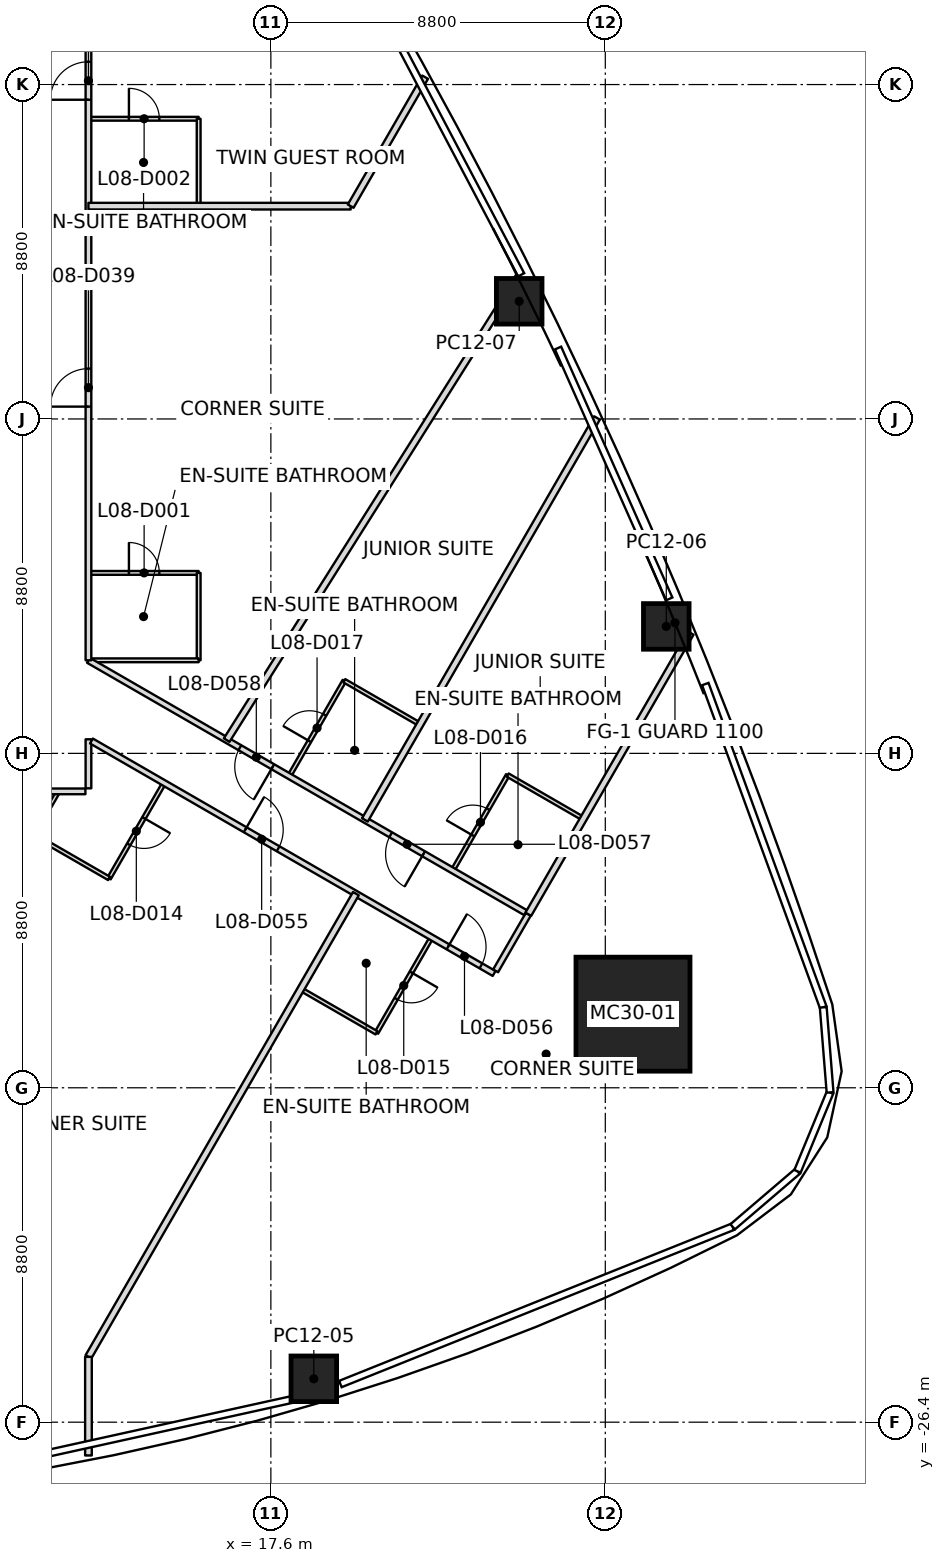
"""IFC4 building model, lengths in metres.
Left out: names, types, materials, properties, quantities, classifications, styles, units other than length and angle.
Written with IfcOpenShell. Run it as: python <this file> out.ifc"""

import sys

from ifc_helpers import new_model, si_unit, direction, frame, frame_2d, origin, origin_2d, place, context, subcontext, project, spatial, rectangle, extrude, clip, halfspace, element, fill, save


model = new_model("IFC4")
c1 = context("Model", 3, precision=1e-05, world=origin(), true_north=direction((0.0, 1.0)))
c2 = subcontext(c1, "Body", "Model", "MODEL_VIEW")
j1 = project(units=[si_unit("LENGTHUNIT", "METRE"), si_unit("PLANEANGLEUNIT", "RADIAN")], contexts=[c1])
p1 = place(None, origin())
s1 = spatial("IfcSite", under=j1, at=p1, CompositionType="ELEMENT")
p2 = place(p1, origin())
s2 = spatial("IfcBuilding", under=s1, at=p2, CompositionType="ELEMENT")
p3 = place(p2, frame((0.0, 0.0, 51.7)))
s3 = spatial("IfcBuildingStorey", under=s2, at=p3, CompositionType="ELEMENT", Elevation=51.7)
p4 = place(p3, frame((27.128, -15.663, 0.0), z_axis=(-0.030531992032, 0.017607001884, 0.999378702468), x_axis=(0.999533790055, 0.000537827582, 0.03052725469)))
e1 = element("IfcColumn", 1, at=p4, inside=s3, PredefinedType="COLUMN", context=c2, shape_type="SweptSolid", body=[
    extrude(rectangle(XDim=3.0, YDim=3.0, at=origin_2d()), origin(), (0.0, 0.0, 1.0), 3.702),
])
p5 = place(p3, frame((18.73, -25.258, 0.0), z_axis=(-0.018960260892, 0.176875858454, 0.984050526753), x_axis=(0.957447491583, 0.286704825548, -0.033085402656)))
e2 = element("IfcColumn", 2, at=p5, inside=s3, PredefinedType="COLUMN", context=c2, shape_type="SweptSolid", body=[
    clip(clip(extrude(rectangle(XDim=1.2, YDim=1.2, at=origin_2d()), origin(), (0.0, 0.0, 1.0), 3.76), halfspace(frame((0.0, 0.0, 0.001)), True)), halfspace(frame((0.0, 0.0, 3.759)), False)),
])
p6 = place(p3, frame((28.005, -5.459, 0.0), z_axis=(-0.019460655113, 0.011016709844, 0.999749926235), x_axis=(-0.381854725948, 0.924054467724, -0.017615588272)))
e3 = element("IfcColumn", 3, at=p6, inside=s3, PredefinedType="COLUMN", context=c2, shape_type="SweptSolid", body=[
    extrude(rectangle(XDim=1.2, YDim=1.2, at=origin_2d()), origin(), (0.0, 0.0, 1.0), 3.701),
])
p7 = place(p3, frame((24.135, 3.097, 0.0), z_axis=(-0.015306644787, 0.002309192102, 0.99988017995), x_axis=(-0.441869025953, 0.897036057616, -0.008836019534)))
e4 = element("IfcColumn", 4, at=p7, inside=s3, PredefinedType="COLUMN", context=c2, shape_type="SweptSolid", body=[
    extrude(rectangle(XDim=1.2, YDim=1.2, at=origin_2d()), origin(), (0.0, 0.0, 1.0), 3.7),
])
p8 = place(p3, frame((19.837, -12.492, 0.0), z_axis=(0.0, 0.0, 1.0), x_axis=(-0.499999252047, -0.866025835615, 0.0)))
e5 = element("IfcWall", 5, at=p8, inside=s3, PredefinedType="PARTITIONING", context=c2, shape_type="SweptSolid", body=[
    extrude(rectangle(XDim=14.074, YDim=0.175, at=frame_2d((7.037, 0.0))), origin(), (0.0, 0.0, 1.0), 2.797),
])
p9 = place(p3, frame((12.8, -24.68, 0.0), z_axis=(0.0, 0.0, 1.0), x_axis=(0.0, -1.0, 0.0)))
e6 = element("IfcWall", 6, at=p9, inside=s3, PredefinedType="PARTITIONING", context=c2, shape_type="SweptSolid", body=[
    extrude(rectangle(XDim=2.595, YDim=0.175, at=frame_2d((1.298, 0.0))), origin(), (0.0, 0.0, 1.0), 2.934),
])
p10 = place(p3, frame((12.8, 5.6, 0.0), z_axis=(0.0, 0.0, 1.0), x_axis=(1.0, 0.0, 0.0)))
e7 = element("IfcWall", 7, at=p10, inside=s3, PredefinedType="PARTITIONING", context=c2, shape_type="SweptSolid", body=[
    extrude(rectangle(XDim=6.9, YDim=0.175, at=frame_2d((3.45, 0.0))), origin(), (0.0, 0.0, 1.0), 3.093),
])
p11 = place(p3, frame((19.7, 5.6, 0.0), z_axis=(0.0, 0.0, 1.0), x_axis=(0.500038841519, 0.866002977462, 0.0)))
e8 = element("IfcWall", 8, at=p11, inside=s3, PredefinedType="PARTITIONING", context=c2, shape_type="SweptSolid", body=[
    extrude(rectangle(XDim=3.919, YDim=0.175, at=frame_2d((1.959, 0.0))), origin(), (0.0, 0.0, 1.0), 2.934),
])
p12 = place(p3, frame((24.12, 3.739, 0.0), z_axis=(0.0, 0.0, 1.0), x_axis=(-0.533199701386, -0.845989407996, 0.0)))
e9 = element("IfcWall", 9, at=p12, inside=s3, PredefinedType="PARTITIONING", context=c2, shape_type="SweptSolid", body=[
    extrude(rectangle(XDim=14.408, YDim=0.175, at=frame_2d((7.204, 0.0))), origin(), (0.0, 0.0, 1.0), 2.947),
])
p13 = place(p3, frame((20.075, -10.551, 0.0), z_axis=(0.0, 0.0, 1.0), x_axis=(0.500002172007, 0.866024149772, 0.0)))
e10 = element("IfcWall", 10, at=p13, inside=s3, PredefinedType="PARTITIONING", context=c2, shape_type="SweptSolid", body=[
    extrude(rectangle(XDim=12.214, YDim=0.175, at=frame_2d((6.107, 0.0))), origin(), (0.0, 0.0, 1.0), 2.934),
])
p14 = place(p3, frame((24.374, -13.033, 0.0), z_axis=(0.0, 0.0, 1.0), x_axis=(0.499992885873, 0.866029511089, 0.0)))
e11 = element("IfcWall", 11, at=p14, inside=s3, PredefinedType="PARTITIONING", context=c2, shape_type="SweptSolid", body=[
    extrude(rectangle(XDim=8.544, YDim=0.175, at=frame_2d((4.272, 0.0))), origin(), (0.0, 0.0, 1.0), 2.934),
])
p15 = place(p3, frame((-12.72, -9.8, 0.0), z_axis=(0.0, 0.0, 1.0), x_axis=(1.0, 0.0, 0.0)))
e12 = element("IfcWall", 12, at=p15, inside=s3, PredefinedType="PARTITIONING", context=c2, shape_type="SweptSolid", body=[
    extrude(rectangle(XDim=25.44, YDim=0.15, at=frame_2d((12.72, 0.0))), origin(), (0.0, 0.0, 1.0), 2.947),
])
p16 = place(p15, frame((7.32, 0.0, 0.0)))
e13 = element("IfcOpeningElement", 13, at=p16, cuts=e12, PredefinedType="OPENING", context=c2, shape_type="SweptSolid", body=[
    extrude(rectangle(XDim=1.0, YDim=2.1, at=frame_2d((0.5, 1.05))), frame((0.0, 0.075, 0.0), z_axis=(0.0, -1.0, 0.0), x_axis=(1.0, 0.0, 0.0)), (0.0, 0.0, 1.0), 0.15),
])
p17 = place(p15, frame((11.52, 0.0, 0.0)))
e14 = element("IfcOpeningElement", 14, at=p17, cuts=e12, PredefinedType="OPENING", context=c2, shape_type="SweptSolid", body=[
    extrude(rectangle(XDim=1.0, YDim=2.1, at=frame_2d((0.5, 1.05))), frame((0.0, 0.075, 0.0), z_axis=(0.0, -1.0, 0.0), x_axis=(1.0, 0.0, 0.0)), (0.0, 0.0, 1.0), 0.15),
])
p18 = place(p15, frame((15.72, 0.0, 0.0)))
e15 = element("IfcOpeningElement", 15, at=p18, cuts=e12, PredefinedType="OPENING", context=c2, shape_type="SweptSolid", body=[
    extrude(rectangle(XDim=1.0, YDim=2.1, at=frame_2d((0.5, 1.05))), frame((0.0, 0.075, 0.0), z_axis=(0.0, -1.0, 0.0), x_axis=(1.0, 0.0, 0.0)), (0.0, 0.0, 1.0), 0.15),
])
p19 = place(p15, frame((19.92, 0.0, 0.0)))
e16 = element("IfcOpeningElement", 16, at=p19, cuts=e12, PredefinedType="OPENING", context=c2, shape_type="SweptSolid", body=[
    extrude(rectangle(XDim=1.0, YDim=2.1, at=frame_2d((0.5, 1.05))), frame((0.0, 0.075, 0.0), z_axis=(0.0, -1.0, 0.0), x_axis=(1.0, 0.0, 0.0)), (0.0, 0.0, 1.0), 0.15),
])
p20 = place(p3, frame((12.8, -9.72, 0.0), z_axis=(0.0, 0.0, 1.0), x_axis=(0.0, 1.0, 0.0)))
e17 = element("IfcWall", 17, at=p20, inside=s3, PredefinedType="PARTITIONING", context=c2, shape_type="SweptSolid", body=[
    extrude(rectangle(XDim=1.291, YDim=0.15, at=frame_2d((0.646, 0.0))), origin(), (0.0, 0.0, 1.0), 2.797),
])
p21 = place(p3, frame((12.879, -8.475, 0.0), z_axis=(0.0, 0.0, 1.0), x_axis=(0.866022744679, -0.500004605677, 0.0)))
e18 = element("IfcWall", 18, at=p21, inside=s3, PredefinedType="PARTITIONING", context=c2, shape_type="SweptSolid", body=[
    extrude(rectangle(XDim=12.234, YDim=0.15, at=frame_2d((6.117, 0.0))), origin(), (0.0, 0.0, 1.0), 2.797),
])
p22 = place(p21, frame((4.671, 0.0, 0.0)))
e19 = element("IfcOpeningElement", 19, at=p22, cuts=e18, PredefinedType="OPENING", context=c2, shape_type="SweptSolid", body=[
    extrude(rectangle(XDim=1.0, YDim=2.1, at=frame_2d((0.5, 1.05))), frame((0.0, 0.075, 0.0), z_axis=(0.0, -1.0, 0.0), x_axis=(1.0, 0.0, 0.0)), (0.0, 0.0, 1.0), 0.15),
])
p23 = place(p21, frame((10.834, 0.0, 0.0)))
e20 = element("IfcOpeningElement", 20, at=p23, cuts=e18, PredefinedType="OPENING", context=c2, shape_type="SweptSolid", body=[
    extrude(rectangle(XDim=1.0, YDim=2.1, at=frame_2d((0.5, 1.05))), frame((0.0, 0.075, 0.0), z_axis=(0.0, -1.0, 0.0), x_axis=(1.0, 0.0, 0.0)), (0.0, 0.0, 1.0), 0.15),
])
p24 = place(p3, frame((23.514, -14.523, 0.0), z_axis=(0.0, 0.0, 1.0), x_axis=(0.500062383118, 0.865989383878, 0.0)))
e21 = element("IfcWall", 21, at=p24, inside=s3, PredefinedType="PARTITIONING", context=c2, shape_type="SweptSolid", body=[
    extrude(rectangle(XDim=1.72, YDim=0.15, at=frame_2d((0.86, 0.0))), origin(), (0.0, 0.0, 1.0), 2.797),
])
p25 = place(p3, frame((24.305, -12.993, 0.0), z_axis=(0.0, 0.0, 1.0), x_axis=(-0.86602583418, 0.499999254532, 0.0)))
e22 = element("IfcWall", 22, at=p25, inside=s3, PredefinedType="PARTITIONING", context=c2, shape_type="SweptSolid", body=[
    extrude(rectangle(XDim=13.285, YDim=0.15, at=frame_2d((6.642, 0.0))), origin(), (0.0, 0.0, 1.0), 2.947),
])
p26 = place(p25, frame((3.102, 0.0, 0.0)))
e23 = element("IfcOpeningElement", 23, at=p26, cuts=e22, PredefinedType="OPENING", context=c2, shape_type="SweptSolid", body=[
    extrude(rectangle(XDim=1.0, YDim=2.1, at=frame_2d((0.5, 1.05))), frame((0.0, 0.075, 0.0), z_axis=(0.0, -1.0, 0.0), x_axis=(1.0, 0.0, 0.0)), (0.0, 0.0, 1.0), 0.15),
])
p27 = place(p25, frame((7.685, 0.0, 0.0)))
e24 = element("IfcOpeningElement", 24, at=p27, cuts=e22, PredefinedType="OPENING", context=c2, shape_type="SweptSolid", body=[
    extrude(rectangle(XDim=1.0, YDim=2.1, at=frame_2d((0.5, 1.05))), frame((0.0, 0.075, 0.0), z_axis=(0.0, -1.0, 0.0), x_axis=(1.0, 0.0, 0.0)), (0.0, 0.0, 1.0), 0.15),
])
p28 = place(p3, frame((12.8, -6.351, 0.0), z_axis=(0.0, 0.0, 1.0), x_axis=(0.0, 1.0, 0.0)))
e25 = element("IfcWall", 25, at=p28, inside=s3, PredefinedType="PARTITIONING", context=c2, shape_type="SweptSolid", body=[
    extrude(rectangle(XDim=16.071, YDim=0.15, at=frame_2d((8.035, 0.0))), origin(), (0.0, 0.0, 1.0), 3.017),
])
p29 = place(p28, frame((6.676, 0.0, 0.0)))
e26 = element("IfcOpeningElement", 26, at=p29, cuts=e25, PredefinedType="OPENING", context=c2, shape_type="SweptSolid", body=[
    extrude(rectangle(XDim=1.0, YDim=2.1, at=frame_2d((0.5, 1.05))), frame((0.0, 0.075, 0.0), z_axis=(0.0, -1.0, 0.0), x_axis=(1.0, 0.0, 0.0)), (0.0, 0.0, 1.0), 0.15),
])
p30 = place(p28, frame((14.751, 0.0, 0.0)))
e27 = element("IfcOpeningElement", 27, at=p30, cuts=e25, PredefinedType="OPENING", context=c2, shape_type="SweptSolid", body=[
    extrude(rectangle(XDim=1.0, YDim=2.1, at=frame_2d((0.5, 1.05))), frame((0.0, 0.075, 0.0), z_axis=(0.0, -1.0, 0.0), x_axis=(1.0, 0.0, 0.0)), (0.0, 0.0, 1.0), 0.15),
])
p31 = place(p3, frame((14.777, -9.605, 0.0), z_axis=(0.0, 0.0, 1.0), x_axis=(-0.499999802827, -0.866025517622, 0.0)))
e28 = element("IfcWall", 28, at=p31, inside=s3, PredefinedType="PARTITIONING", context=c2, shape_type="SweptSolid", body=[
    extrude(rectangle(XDim=2.87, YDim=0.1, at=frame_2d((1.435, 0.0))), origin(), (0.0, 0.0, 1.0), 2.797),
])
p32 = place(p31, frame((1.035, 0.0, 0.0)))
e29 = element("IfcOpeningElement", 29, at=p32, cuts=e28, PredefinedType="OPENING", context=c2, shape_type="SweptSolid", body=[
    extrude(rectangle(XDim=0.8, YDim=2.1, at=frame_2d((0.4, 1.05))), frame((0.0, 0.05, 0.0), z_axis=(0.0, -1.0, 0.0), x_axis=(1.0, 0.0, 0.0)), (0.0, 0.0, 1.0), 0.1),
])
p33 = place(p3, frame((13.342, -12.091, 0.0), z_axis=(0.0, 0.0, 1.0), x_axis=(-0.86602648383, 0.499998129301, 0.0)))
e30 = element("IfcWall", 30, at=p33, inside=s3, PredefinedType="PARTITIONING", context=c2, shape_type="SweptSolid", body=[
    extrude(rectangle(XDim=2.3, YDim=0.1, at=frame_2d((1.15, 0.0))), origin(), (0.0, 0.0, 1.0), 2.947),
])
p34 = place(p3, frame((11.35, -10.941, 0.0), z_axis=(0.0, 0.0, 1.0), x_axis=(0.499865263774, 0.866103179807, 0.0)))
e31 = element("IfcWall", 31, at=p34, inside=s3, PredefinedType="PARTITIONING", context=c2, shape_type="SweptSolid", body=[
    extrude(rectangle(XDim=1.282, YDim=0.1, at=frame_2d((0.641, 0.0))), origin(), (0.0, 0.0, 1.0), 3.15),
])
p35 = place(p3, frame((12.83, -4.051, 0.0), z_axis=(0.0, 0.0, 1.0), x_axis=(1.0, 0.0, 0.0)))
e32 = element("IfcWall", 32, at=p35, inside=s3, PredefinedType="PARTITIONING", context=c2, shape_type="SweptSolid", body=[
    extrude(rectangle(XDim=2.87, YDim=0.1, at=frame_2d((1.435, 0.0))), origin(), (0.0, 0.0, 1.0), 3.15),
])
p36 = place(p35, frame((1.035, 0.0, 0.0)))
e33 = element("IfcOpeningElement", 33, at=p36, cuts=e32, PredefinedType="OPENING", context=c2, shape_type="SweptSolid", body=[
    extrude(rectangle(XDim=0.8, YDim=2.1, at=frame_2d((0.4, 1.05))), frame((0.0, 0.05, 0.0), z_axis=(0.0, -1.0, 0.0), x_axis=(1.0, 0.0, 0.0)), (0.0, 0.0, 1.0), 0.1),
])
p37 = place(p3, frame((15.7, -4.051, 0.0), z_axis=(0.0, 0.0, 1.0), x_axis=(0.0, -1.0, 0.0)))
e34 = element("IfcWall", 34, at=p37, inside=s3, PredefinedType="PARTITIONING", context=c2, shape_type="SweptSolid", body=[
    extrude(rectangle(XDim=2.3, YDim=0.1, at=frame_2d((1.15, 0.0))), origin(), (0.0, 0.0, 1.0), 2.947),
])
p38 = place(p3, frame((15.7, -6.351, 0.0), z_axis=(0.0, 0.0, 1.0), x_axis=(-1.0, 0.0, 0.0)))
e35 = element("IfcWall", 35, at=p38, inside=s3, PredefinedType="PARTITIONING", context=c2, shape_type="SweptSolid", body=[
    extrude(rectangle(XDim=2.84, YDim=0.1, at=frame_2d((1.42, 0.0))), origin(), (0.0, 0.0, 1.0), 2.947),
])
p39 = place(p3, frame((12.83, 7.9, 0.0), z_axis=(0.0, 0.0, 1.0), x_axis=(1.0, 0.0, 0.0)))
e36 = element("IfcWall", 36, at=p39, inside=s3, PredefinedType="PARTITIONING", context=c2, shape_type="SweptSolid", body=[
    extrude(rectangle(XDim=2.87, YDim=0.1, at=frame_2d((1.435, 0.0))), origin(), (0.0, 0.0, 1.0), 3.15),
])
p40 = place(p39, frame((1.035, 0.0, 0.0)))
e37 = element("IfcOpeningElement", 37, at=p40, cuts=e36, PredefinedType="OPENING", context=c2, shape_type="SweptSolid", body=[
    extrude(rectangle(XDim=0.8, YDim=2.1, at=frame_2d((0.4, 1.05))), frame((0.0, 0.05, 0.0), z_axis=(0.0, -1.0, 0.0), x_axis=(1.0, 0.0, 0.0)), (0.0, 0.0, 1.0), 0.1),
])
p41 = place(p3, frame((15.7, 7.9, 0.0), z_axis=(0.0, 0.0, 1.0), x_axis=(0.0, -1.0, 0.0)))
e38 = element("IfcWall", 38, at=p41, inside=s3, PredefinedType="PARTITIONING", context=c2, shape_type="SweptSolid", body=[
    extrude(rectangle(XDim=2.27, YDim=0.1, at=frame_2d((1.135, 0.0))), origin(), (0.0, 0.0, 1.0), 3.15),
])
p42 = place(p3, frame((18.098, -9.375, 0.0), z_axis=(0.0, 0.0, 1.0), x_axis=(0.499936001555, 0.866062350151, 0.0)))
e39 = element("IfcWall", 39, at=p42, inside=s3, PredefinedType="PARTITIONING", context=c2, shape_type="SweptSolid", body=[
    extrude(rectangle(XDim=2.87, YDim=0.1, at=frame_2d((1.435, 0.0))), origin(), (0.0, 0.0, 1.0), 2.947),
])
p43 = place(p42, frame((1.035, 0.0, 0.0)))
e40 = element("IfcOpeningElement", 40, at=p43, cuts=e39, PredefinedType="OPENING", context=c2, shape_type="SweptSolid", body=[
    extrude(rectangle(XDim=0.8, YDim=2.1, at=frame_2d((0.4, 1.05))), frame((0.0, 0.05, 0.0), z_axis=(0.0, -1.0, 0.0), x_axis=(1.0, 0.0, 0.0)), (0.0, 0.0, 1.0), 0.1),
])
p44 = place(p3, frame((19.533, -6.889, 0.0), z_axis=(0.0, 0.0, 1.0), x_axis=(0.866017224141, -0.500014167291, 0.0)))
e41 = element("IfcWall", 41, at=p44, inside=s3, PredefinedType="PARTITIONING", context=c2, shape_type="SweptSolid", body=[
    extrude(rectangle(XDim=2.27, YDim=0.1, at=frame_2d((1.135, 0.0))), origin(), (0.0, 0.0, 1.0), 2.947),
])
p45 = place(p3, frame((21.814, -13.668, 0.0), z_axis=(0.0, 0.0, 1.0), x_axis=(-0.499972835562, -0.866041086612, 0.0)))
e42 = element("IfcWall", 42, at=p45, inside=s3, PredefinedType="PARTITIONING", context=c2, shape_type="SweptSolid", body=[
    extrude(rectangle(XDim=2.87, YDim=0.1, at=frame_2d((1.435, 0.0))), origin(), (0.0, 0.0, 1.0), 3.15),
])
p46 = place(p45, frame((1.035, 0.0, 0.0)))
e43 = element("IfcOpeningElement", 43, at=p46, cuts=e42, PredefinedType="OPENING", context=c2, shape_type="SweptSolid", body=[
    extrude(rectangle(XDim=0.8, YDim=2.1, at=frame_2d((0.4, 1.05))), frame((0.0, 0.05, 0.0), z_axis=(0.0, -1.0, 0.0), x_axis=(1.0, 0.0, 0.0)), (0.0, 0.0, 1.0), 0.1),
])
p47 = place(p3, frame((20.379, -16.154, 0.0), z_axis=(0.0, 0.0, 1.0), x_axis=(-0.866044110172, 0.499967598186, 0.0)))
e44 = element("IfcWall", 44, at=p47, inside=s3, PredefinedType="PARTITIONING", context=c2, shape_type="SweptSolid", body=[
    extrude(rectangle(XDim=2.27, YDim=0.1, at=frame_2d((1.135, 0.0))), origin(), (0.0, 0.0, 1.0), 3.15),
])
p48 = place(p3, frame((22.397, -11.857, 0.0), z_axis=(0.0, 0.0, 1.0), x_axis=(0.499999802827, 0.866025517622, 0.0)))
e45 = element("IfcWall", 45, at=p48, inside=s3, PredefinedType="PARTITIONING", context=c2, shape_type="SweptSolid", body=[
    extrude(rectangle(XDim=2.87, YDim=0.1, at=frame_2d((1.435, 0.0))), origin(), (0.0, 0.0, 1.0), 3.15),
])
p49 = place(p48, frame((1.035, 0.0, 0.0)))
e46 = element("IfcOpeningElement", 46, at=p49, cuts=e45, PredefinedType="OPENING", context=c2, shape_type="SweptSolid", body=[
    extrude(rectangle(XDim=0.8, YDim=2.1, at=frame_2d((0.4, 1.05))), frame((0.0, 0.05, 0.0), z_axis=(0.0, -1.0, 0.0), x_axis=(1.0, 0.0, 0.0)), (0.0, 0.0, 1.0), 0.1),
])
p50 = place(p3, frame((23.833, -9.372, 0.0), z_axis=(0.0, 0.0, 1.0), x_axis=(0.866017224141, -0.500014167291, 0.0)))
e47 = element("IfcWall", 47, at=p50, inside=s3, PredefinedType="PARTITIONING", context=c2, shape_type="SweptSolid", body=[
    extrude(rectangle(XDim=2.27, YDim=0.1, at=frame_2d((1.135, 0.0))), origin(), (0.0, 0.0, 1.0), 3.15),
])
p51 = place(p29, origin())
e48 = element("IfcDoor", 48, at=p51, inside=s3, OperationType="SINGLE_SWING_LEFT", PredefinedType="DOOR", context=c2, shape_type="SweptSolid", body=[
    extrude(rectangle(XDim=1.0, YDim=2.1, at=frame_2d((0.5, 1.05))), frame((0.0, 0.025, 0.0), z_axis=(0.0, -1.0, 0.0), x_axis=(1.0, 0.0, 0.0)), (0.0, 0.0, 1.0), 0.05),
])
fill(e26, e48)
p52 = place(p36, origin())
e49 = element("IfcDoor", 49, at=p52, inside=s3, OperationType="SINGLE_SWING_LEFT", PredefinedType="DOOR", context=c2, shape_type="SweptSolid", body=[
    extrude(rectangle(XDim=0.8, YDim=2.1, at=frame_2d((0.4, 1.05))), frame((0.0, 0.025, 0.0), z_axis=(0.0, -1.0, 0.0), x_axis=(1.0, 0.0, 0.0)), (0.0, 0.0, 1.0), 0.05),
])
fill(e33, e49)
p53 = place(p30, origin())
e50 = element("IfcDoor", 50, at=p53, inside=s3, OperationType="SINGLE_SWING_LEFT", PredefinedType="DOOR", context=c2, shape_type="SweptSolid", body=[
    extrude(rectangle(XDim=1.0, YDim=2.1, at=frame_2d((0.5, 1.05))), frame((0.0, 0.025, 0.0), z_axis=(0.0, -1.0, 0.0), x_axis=(1.0, 0.0, 0.0)), (0.0, 0.0, 1.0), 0.05),
])
fill(e27, e50)
p54 = place(p40, origin())
e51 = element("IfcDoor", 51, at=p54, inside=s3, OperationType="SINGLE_SWING_RIGHT", PredefinedType="DOOR", context=c2, shape_type="SweptSolid", body=[
    extrude(rectangle(XDim=0.8, YDim=2.1, at=frame_2d((0.4, 1.05))), frame((0.0, 0.025, 0.0), z_axis=(0.0, -1.0, 0.0), x_axis=(1.0, 0.0, 0.0)), (0.0, 0.0, 1.0), 0.05),
])
fill(e37, e51)
p55 = place(p22, origin())
e52 = element("IfcDoor", 52, at=p55, inside=s3, OperationType="SINGLE_SWING_LEFT", PredefinedType="DOOR", context=c2, shape_type="SweptSolid", body=[
    extrude(rectangle(XDim=1.0, YDim=2.1, at=frame_2d((0.5, 1.05))), frame((0.0, 0.025, 0.0), z_axis=(0.0, -1.0, 0.0), x_axis=(1.0, 0.0, 0.0)), (0.0, 0.0, 1.0), 0.05),
])
fill(e19, e52)
p56 = place(p32, origin())
e53 = element("IfcDoor", 53, at=p56, inside=s3, OperationType="SINGLE_SWING_RIGHT", PredefinedType="DOOR", context=c2, shape_type="SweptSolid", body=[
    extrude(rectangle(XDim=0.8, YDim=2.1, at=frame_2d((0.4, 1.05))), frame((0.0, 0.025, 0.0), z_axis=(0.0, -1.0, 0.0), x_axis=(1.0, 0.0, 0.0)), (0.0, 0.0, 1.0), 0.05),
])
fill(e29, e53)
p57 = place(p23, origin())
e54 = element("IfcDoor", 54, at=p57, inside=s3, OperationType="SINGLE_SWING_LEFT", PredefinedType="DOOR", context=c2, shape_type="SweptSolid", body=[
    extrude(rectangle(XDim=1.0, YDim=2.1, at=frame_2d((0.5, 1.05))), frame((0.0, 0.025, 0.0), z_axis=(0.0, -1.0, 0.0), x_axis=(1.0, 0.0, 0.0)), (0.0, 0.0, 1.0), 0.05),
])
fill(e20, e54)
p58 = place(p46, origin())
e55 = element("IfcDoor", 55, at=p58, inside=s3, OperationType="SINGLE_SWING_LEFT", PredefinedType="DOOR", context=c2, shape_type="SweptSolid", body=[
    extrude(rectangle(XDim=0.8, YDim=2.1, at=frame_2d((0.4, 1.05))), frame((0.0, 0.025, 0.0), z_axis=(0.0, -1.0, 0.0), x_axis=(1.0, 0.0, 0.0)), (0.0, 0.0, 1.0), 0.05),
])
fill(e43, e55)
p59 = place(p26, origin())
e56 = element("IfcDoor", 56, at=p59, inside=s3, OperationType="SINGLE_SWING_LEFT", PredefinedType="DOOR", context=c2, shape_type="SweptSolid", body=[
    extrude(rectangle(XDim=1.0, YDim=2.1, at=frame_2d((0.5, 1.05))), frame((0.0, 0.025, 0.0), z_axis=(0.0, -1.0, 0.0), x_axis=(1.0, 0.0, 0.0)), (0.0, 0.0, 1.0), 0.05),
])
fill(e23, e56)
p60 = place(p49, origin())
e57 = element("IfcDoor", 57, at=p60, inside=s3, OperationType="SINGLE_SWING_LEFT", PredefinedType="DOOR", context=c2, shape_type="SweptSolid", body=[
    extrude(rectangle(XDim=0.8, YDim=2.1, at=frame_2d((0.4, 1.05))), frame((0.0, 0.025, 0.0), z_axis=(0.0, -1.0, 0.0), x_axis=(1.0, 0.0, 0.0)), (0.0, 0.0, 1.0), 0.05),
])
fill(e46, e57)
p61 = place(p27, origin())
e58 = element("IfcDoor", 58, at=p61, inside=s3, OperationType="SINGLE_SWING_LEFT", PredefinedType="DOOR", context=c2, shape_type="SweptSolid", body=[
    extrude(rectangle(XDim=1.0, YDim=2.1, at=frame_2d((0.5, 1.05))), frame((0.0, 0.025, 0.0), z_axis=(0.0, -1.0, 0.0), x_axis=(1.0, 0.0, 0.0)), (0.0, 0.0, 1.0), 0.05),
])
fill(e24, e58)
p62 = place(p43, origin())
e59 = element("IfcDoor", 59, at=p62, inside=s3, OperationType="SINGLE_SWING_RIGHT", PredefinedType="DOOR", context=c2, shape_type="SweptSolid", body=[
    extrude(rectangle(XDim=0.8, YDim=2.1, at=frame_2d((0.4, 1.05))), frame((0.0, 0.025, 0.0), z_axis=(0.0, -1.0, 0.0), x_axis=(1.0, 0.0, 0.0)), (0.0, 0.0, 1.0), 0.05),
])
fill(e40, e59)
save(model, sys.argv[1])
